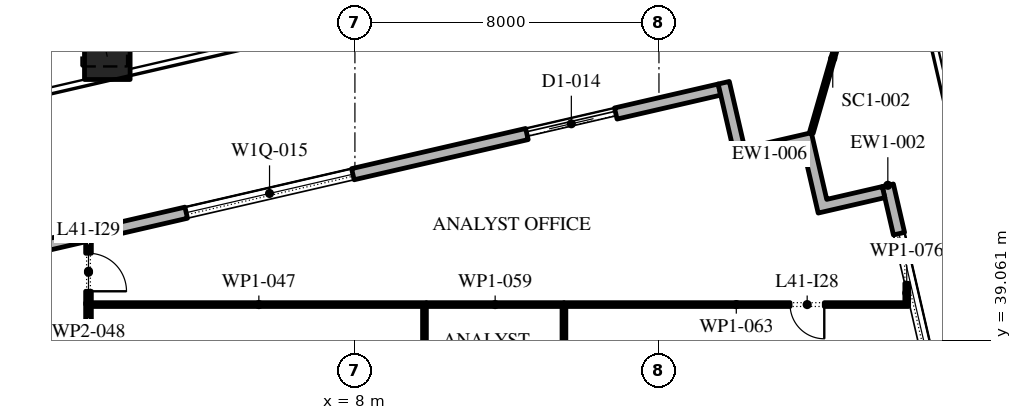
"""IFC4 building model, lengths in metres.
Left out: names, types, materials, properties, quantities, classifications, styles, units other than length and angle.
Written with IfcOpenShell. Run it as: python <this file> out.ifc"""

import sys

from ifc_helpers import new_model, si_unit, direction, frame, frame_2d, origin, origin_2d, place, context, subcontext, project, spatial, polyline, rectangle, outline, extrude, element, fill, save


model = new_model("IFC4")
c1 = context("Model", 3, precision=1e-05, world=origin(), true_north=direction((0.0, 1.0)))
c2 = subcontext(c1, "Body", "Model", "MODEL_VIEW")
j1 = project(units=[si_unit("LENGTHUNIT", "METRE"), si_unit("PLANEANGLEUNIT", "RADIAN")], contexts=[c1])
p1 = place(None, origin())
s1 = spatial("IfcSite", under=j1, at=p1, CompositionType="ELEMENT")
p2 = place(p1, origin())
s2 = spatial("IfcBuilding", under=s1, at=p2, CompositionType="ELEMENT")
p3 = place(p2, frame((0.0, 0.0, 188.4)))
s3 = spatial("IfcBuildingStorey", under=s2, at=p3, CompositionType="ELEMENT", Elevation=188.4)
p4 = place(p3, frame((1.485, 46.522, 0.0), z_axis=(-0.018824669328, 0.081554259734, 0.996491111121), x_axis=(-0.974379530941, -0.22491004798, 0.0)))
e1 = element("IfcColumn", 1, at=p4, inside=s3, PredefinedType="COLUMN", context=c2, shape_type="SweptSolid", body=[
    extrude(rectangle(XDim=1.2, YDim=1.2, at=origin_2d()), origin(), (0.0, 0.0, 1.0), 4.215),
])
p5 = place(p3, frame((33.157, -5.092, 0.0), z_axis=(0.0, 0.0, 1.0), x_axis=(-0.224950279389, 0.974370243697, 0.0)))
e2 = element("IfcWall", 2, at=p5, inside=s3, PredefinedType="STANDARD", context=c2, shape_type="SweptSolid", body=[
    extrude(rectangle(XDim=49.5, YDim=0.3, at=frame_2d((24.75, 0.0))), origin(), (0.0, 0.0, 1.0), 4.0),
])
p6 = place(p5, frame((2.207, 0.0, 0.0)))
e3 = element("IfcOpeningElement", 3, at=p6, cuts=e2, PredefinedType="OPENING", context=c2, shape_type="SweptSolid", body=[
    extrude(rectangle(XDim=2.4, YDim=3.125, at=frame_2d((1.2, 1.562))), frame((0.0, 0.16, 0.0), z_axis=(0.0, -1.0, 0.0), x_axis=(1.0, 0.0, 0.0)), (0.0, 0.0, 1.0), 0.32),
])
p7 = place(p5, frame((8.121, 0.0, 0.45)))
e4 = element("IfcOpeningElement", 4, at=p7, cuts=e2, PredefinedType="OPENING", context=c2, shape_type="SweptSolid", body=[
    extrude(rectangle(XDim=4.5, YDim=2.875, at=frame_2d((2.25, 1.438))), frame((0.0, 0.16, 0.0), z_axis=(0.0, -1.0, 0.0), x_axis=(1.0, 0.0, 0.0)), (0.0, 0.0, 1.0), 0.32),
])
p8 = place(p5, frame((15.236, 0.0, 0.45)))
e5 = element("IfcOpeningElement", 5, at=p8, cuts=e2, PredefinedType="OPENING", context=c2, shape_type="SweptSolid", body=[
    extrude(rectangle(XDim=4.5, YDim=2.875, at=frame_2d((2.25, 1.438))), frame((0.0, 0.16, 0.0), z_axis=(0.0, -1.0, 0.0), x_axis=(1.0, 0.0, 0.0)), (0.0, 0.0, 1.0), 0.32),
])
p9 = place(p5, frame((22.35, 0.0, 0.45)))
e6 = element("IfcOpeningElement", 6, at=p9, cuts=e2, PredefinedType="OPENING", context=c2, shape_type="SweptSolid", body=[
    extrude(rectangle(XDim=4.5, YDim=3.0, at=frame_2d((2.25, 1.5))), frame((0.0, 0.16, 0.0), z_axis=(0.0, -1.0, 0.0), x_axis=(1.0, 0.0, 0.0)), (0.0, 0.0, 1.0), 0.32),
])
p10 = place(p5, frame((30.514, 0.0, 0.0)))
e7 = element("IfcOpeningElement", 7, at=p10, cuts=e2, PredefinedType="OPENING", context=c2, shape_type="SweptSolid", body=[
    extrude(rectangle(XDim=2.4, YDim=3.45, at=frame_2d((1.2, 1.725))), frame((0.0, 0.16, 0.0), z_axis=(0.0, -1.0, 0.0), x_axis=(1.0, 0.0, 0.0)), (0.0, 0.0, 1.0), 0.32),
])
p11 = place(p5, frame((36.579, 0.0, 0.45)))
e8 = element("IfcOpeningElement", 8, at=p11, cuts=e2, PredefinedType="OPENING", context=c2, shape_type="SweptSolid", body=[
    extrude(rectangle(XDim=4.5, YDim=3.05, at=frame_2d((2.25, 1.525))), frame((0.0, 0.16, 0.0), z_axis=(0.0, -1.0, 0.0), x_axis=(1.0, 0.0, 0.0)), (0.0, 0.0, 1.0), 0.32),
])
p12 = place(p5, frame((43.693, 0.0, 0.45)))
e9 = element("IfcOpeningElement", 9, at=p12, cuts=e2, PredefinedType="OPENING", context=c2, shape_type="SweptSolid", body=[
    extrude(rectangle(XDim=4.5, YDim=3.05, at=frame_2d((2.25, 1.525))), frame((0.0, 0.16, 0.0), z_axis=(0.0, -1.0, 0.0), x_axis=(1.0, 0.0, 0.0)), (0.0, 0.0, 1.0), 0.32),
])
p13 = place(p3, frame((17.592, 45.657, 0.0), z_axis=(0.0, 0.0, 1.0), x_axis=(-0.974370243697, -0.224950279389, 0.0)))
e10 = element("IfcWall", 10, at=p13, inside=s3, PredefinedType="STANDARD", context=c2, shape_type="SweptSolid", body=[
    extrude(rectangle(XDim=49.5, YDim=0.3, at=frame_2d((24.75, 0.0))), origin(), (0.0, 0.0, 1.0), 4.0),
])
p14 = place(p13, frame((2.8, 0.0, 0.0)))
e11 = element("IfcOpeningElement", 11, at=p14, cuts=e10, PredefinedType="OPENING", context=c2, shape_type="SweptSolid", body=[
    extrude(rectangle(XDim=2.4, YDim=3.5, at=frame_2d((1.2, 1.75))), frame((0.0, 0.16, 0.0), z_axis=(0.0, -1.0, 0.0), x_axis=(1.0, 0.0, 0.0)), (0.0, 0.0, 1.0), 0.32),
])
p15 = place(p13, frame((9.9, 0.0, 0.45)))
e12 = element("IfcOpeningElement", 12, at=p15, cuts=e10, PredefinedType="OPENING", context=c2, shape_type="SweptSolid", body=[
    extrude(rectangle(XDim=4.5, YDim=2.45, at=frame_2d((2.25, 1.225))), frame((0.0, 0.16, 0.0), z_axis=(0.0, -1.0, 0.0), x_axis=(1.0, 0.0, 0.0)), (0.0, 0.0, 1.0), 0.32),
])
p16 = place(p13, frame((18.2, 0.0, 0.45)))
e13 = element("IfcOpeningElement", 13, at=p16, cuts=e10, PredefinedType="OPENING", context=c2, shape_type="SweptSolid", body=[
    extrude(rectangle(XDim=4.5, YDim=2.45, at=frame_2d((2.25, 1.225))), frame((0.0, 0.16, 0.0), z_axis=(0.0, -1.0, 0.0), x_axis=(1.0, 0.0, 0.0)), (0.0, 0.0, 1.0), 0.32),
])
p17 = place(p13, frame((26.5, 0.0, 0.45)))
e14 = element("IfcOpeningElement", 14, at=p17, cuts=e10, PredefinedType="OPENING", context=c2, shape_type="SweptSolid", body=[
    extrude(rectangle(XDim=4.5, YDim=2.525, at=frame_2d((2.25, 1.262))), frame((0.0, 0.16, 0.0), z_axis=(0.0, -1.0, 0.0), x_axis=(1.0, 0.0, 0.0)), (0.0, 0.0, 1.0), 0.32),
])
p18 = place(p13, frame((35.85, 0.0, 0.0)))
e15 = element("IfcOpeningElement", 15, at=p18, cuts=e10, PredefinedType="OPENING", context=c2, shape_type="SweptSolid", body=[
    extrude(rectangle(XDim=2.4, YDim=3.5, at=frame_2d((1.2, 1.75))), frame((0.0, 0.16, 0.0), z_axis=(0.0, -1.0, 0.0), x_axis=(1.0, 0.0, 0.0)), (0.0, 0.0, 1.0), 0.32),
])
p19 = place(p13, frame((43.1, 0.0, 0.45)))
e16 = element("IfcOpeningElement", 16, at=p19, cuts=e10, PredefinedType="OPENING", context=c2, shape_type="SweptSolid", body=[
    extrude(rectangle(XDim=4.5, YDim=2.675, at=frame_2d((2.25, 1.337))), frame((0.0, 0.16, 0.0), z_axis=(0.0, -1.0, 0.0), x_axis=(1.0, 0.0, 0.0)), (0.0, 0.0, 1.0), 0.32),
])
p20 = place(p3, origin())
e17 = element("IfcWall", 17, at=p20, inside=s3, PredefinedType="STANDARD", context=c2, shape_type="SweptSolid", body=[
    extrude(outline(polyline([(19.785, 44.162), (18.031, 43.757), (17.558, 45.803), (17.851, 45.871), (18.256, 44.117), (20.01, 44.522), (20.414, 42.768), (21.876, 43.105), (21.943, 42.813), (20.19, 42.408), (19.785, 44.162)])), origin(), (0.0, 0.0, 1.0), 4.0),
])
p21 = place(p3, frame((20.01, 44.522, -0.05), z_axis=(0.0, 0.0, 1.0), x_axis=(0.276962557442, 0.960880711522, 0.0)))
e18 = element("IfcWall", 18, at=p21, inside=s3, PredefinedType="STANDARD", context=c2, shape_type="SweptSolid", body=[
    extrude(rectangle(XDim=4.07, YDim=0.1, at=frame_2d((2.035, 0.0))), origin(), (0.0, 0.0, 1.0), 4.05),
])
p22 = place(p3, frame((0.99, 40.05, 0.0), z_axis=(0.0, 0.0, 1.0), x_axis=(0.0, -1.0, 0.0)))
e19 = element("IfcWall", 19, at=p22, inside=s3, PredefinedType="PARTITIONING", context=c2, shape_type="SweptSolid", body=[
    extrude(rectangle(XDim=8.55, YDim=0.15, at=frame_2d((4.275, 0.0))), origin(), (0.0, 0.0, 1.0), 4.0),
])
p23 = place(p22, frame((2.9, 0.0, 0.0)))
e20 = element("IfcOpeningElement", 20, at=p23, cuts=e19, PredefinedType="OPENING", context=c2, shape_type="SweptSolid", body=[
    extrude(rectangle(XDim=1.0, YDim=2.1, at=frame_2d((0.5, 1.05))), frame((0.0, 0.085, 0.0), z_axis=(0.0, -1.0, 0.0), x_axis=(1.0, 0.0, 0.0)), (0.0, 0.0, 1.0), 0.17),
])
p24 = place(p3, frame((1.065, 40.0, 0.0), z_axis=(0.0, 0.0, 1.0), x_axis=(1.0, 0.0, 0.0)))
e21 = element("IfcWall", 21, at=p24, inside=s3, PredefinedType="PARTITIONING", context=c2, shape_type="SweptSolid", body=[
    extrude(rectangle(XDim=8.815, YDim=0.1, at=frame_2d((4.407, 0.0))), origin(), (0.0, 0.0, 1.0), 4.0),
])
p25 = place(p3, frame((0.99, 41.753, 0.0), z_axis=(0.0, 0.0, 1.0), x_axis=(0.0, -1.0, 0.0)))
e22 = element("IfcWall", 22, at=p25, inside=s3, PredefinedType="PARTITIONING", context=c2, shape_type="SweptSolid", body=[
    extrude(rectangle(XDim=1.753, YDim=0.15, at=frame_2d((0.876, 0.0))), origin(), (0.0, 0.0, 1.0), 4.0),
])
p26 = place(p25, frame((0.403, 0.0, 0.0)))
e23 = element("IfcOpeningElement", 23, at=p26, cuts=e22, PredefinedType="OPENING", context=c2, shape_type="SweptSolid", body=[
    extrude(rectangle(XDim=1.0, YDim=2.1, at=frame_2d((0.5, 1.05))), frame((0.0, 0.085, 0.0), z_axis=(0.0, -1.0, 0.0), x_axis=(1.0, 0.0, 0.0)), (0.0, 0.0, 1.0), 0.17),
])
p27 = place(p3, frame((9.83, 39.95, 0.0), z_axis=(0.0, 0.0, 1.0), x_axis=(0.0, -1.0, 0.0)))
e24 = element("IfcWall", 24, at=p27, inside=s3, PredefinedType="PARTITIONING", context=c2, shape_type="SweptSolid", body=[
    extrude(rectangle(XDim=8.4, YDim=0.1, at=frame_2d((4.2, 0.0))), origin(), (0.0, 0.0, 1.0), 4.0),
])
p28 = place(p27, frame((4.6, 0.0, 0.0)))
e25 = element("IfcOpeningElement", 25, at=p28, cuts=e24, PredefinedType="OPENING", context=c2, shape_type="SweptSolid", body=[
    extrude(rectangle(XDim=0.9, YDim=2.1, at=frame_2d((0.45, 1.05))), frame((0.0, 0.06, 0.0), z_axis=(0.0, -1.0, 0.0), x_axis=(1.0, 0.0, 0.0)), (0.0, 0.0, 1.0), 0.12),
])
p29 = place(p3, frame((9.88, 40.0, 0.0), z_axis=(0.0, 0.0, 1.0), x_axis=(1.0, 0.0, 0.0)))
e26 = element("IfcWall", 26, at=p29, inside=s3, PredefinedType="PARTITIONING", context=c2, shape_type="SweptSolid", body=[
    extrude(rectangle(XDim=3.62, YDim=0.1, at=frame_2d((1.81, 0.0))), origin(), (0.0, 0.0, 1.0), 4.0),
])
p30 = place(p3, frame((13.5, 39.95, 0.0), z_axis=(0.0, 0.0, 1.0), x_axis=(0.0, -1.0, 0.0)))
e27 = element("IfcWall", 27, at=p30, inside=s3, PredefinedType="PARTITIONING", context=c2, shape_type="SweptSolid", body=[
    extrude(rectangle(XDim=8.4, YDim=0.1, at=frame_2d((4.2, 0.0))), origin(), (0.0, 0.0, 1.0), 4.0),
])
p31 = place(p3, frame((13.5, 40.0, 0.0), z_axis=(0.0, 0.0, 1.0), x_axis=(1.0, 0.0, 0.0)))
e28 = element("IfcWall", 28, at=p31, inside=s3, PredefinedType="PARTITIONING", context=c2, shape_type="SweptSolid", body=[
    extrude(rectangle(XDim=9.07, YDim=0.1, at=frame_2d((4.535, 0.0))), origin(), (0.0, 0.0, 1.0), 4.0),
])
p32 = place(p31, frame((5.95, 0.0, 0.0)))
e29 = element("IfcOpeningElement", 29, at=p32, cuts=e28, PredefinedType="OPENING", context=c2, shape_type="SweptSolid", body=[
    extrude(rectangle(XDim=0.9, YDim=2.1, at=frame_2d((0.45, 1.05))), frame((0.0, 0.06, 0.0), z_axis=(0.0, -1.0, 0.0), x_axis=(1.0, 0.0, 0.0)), (0.0, 0.0, 1.0), 0.12),
])
p33 = place(p3, frame((22.52, 40.05, 0.0), z_axis=(0.0, 0.0, 1.0), x_axis=(0.0, 1.0, 0.0)))
e30 = element("IfcWall", 30, at=p33, inside=s3, PredefinedType="PARTITIONING", context=c2, shape_type="SweptSolid", body=[
    extrude(rectangle(XDim=0.51, YDim=0.1, at=frame_2d((0.255, 0.0))), origin(), (0.0, 0.0, 1.0), 4.0),
])
p34 = place(p12, origin())
e31 = element("IfcWindow", 31, at=p34, inside=s3, PartitioningType="DOUBLE_PANEL_VERTICAL", PredefinedType="WINDOW", context=c2, shape_type="SweptSolid", body=[
    extrude(rectangle(XDim=4.5, YDim=3.05, at=frame_2d((2.25, 1.525))), frame((0.0, 0.03, 0.0), z_axis=(0.0, -1.0, 0.0), x_axis=(1.0, 0.0, 0.0)), (0.0, 0.0, 1.0), 0.06),
])
fill(e9, e31)
p35 = place(p14, origin())
e32 = element("IfcDoor", 32, at=p35, inside=s3, OperationType="DOUBLE_DOOR_SLIDING", PredefinedType="DOOR", context=c2, shape_type="SweptSolid", body=[
    extrude(rectangle(XDim=2.4, YDim=3.5, at=frame_2d((1.2, 1.75))), frame((0.0, 0.025, 0.0), z_axis=(0.0, -1.0, 0.0), x_axis=(1.0, 0.0, 0.0)), (0.0, 0.0, 1.0), 0.05),
])
fill(e11, e32)
p36 = place(p15, origin())
e33 = element("IfcWindow", 33, at=p36, inside=s3, PartitioningType="DOUBLE_PANEL_VERTICAL", PredefinedType="WINDOW", context=c2, shape_type="SweptSolid", body=[
    extrude(rectangle(XDim=4.5, YDim=2.45, at=frame_2d((2.25, 1.225))), frame((0.0, 0.03, 0.0), z_axis=(0.0, -1.0, 0.0), x_axis=(1.0, 0.0, 0.0)), (0.0, 0.0, 1.0), 0.06),
])
fill(e12, e33)
p37 = place(p32, frame((0.9, 0.0, 0.0), z_axis=(0.0, 0.0, 1.0), x_axis=(-1.0, 0.0, 0.0)))
e34 = element("IfcDoor", 34, at=p37, inside=s3, OperationType="SINGLE_SWING_RIGHT", PredefinedType="DOOR", context=c2, shape_type="SweptSolid", body=[
    extrude(rectangle(XDim=0.9, YDim=2.1, at=frame_2d((0.45, 1.05))), frame((0.0, 0.025, 0.0), z_axis=(0.0, -1.0, 0.0), x_axis=(1.0, 0.0, 0.0)), (0.0, 0.0, 1.0), 0.05),
])
fill(e29, e34)
p38 = place(p26, origin())
e35 = element("IfcDoor", 35, at=p38, inside=s3, OperationType="SINGLE_SWING_LEFT", PredefinedType="DOOR", context=c2, shape_type="SweptSolid", body=[
    extrude(rectangle(XDim=1.0, YDim=2.1, at=frame_2d((0.5, 1.05))), frame((0.0, 0.025, 0.0), z_axis=(0.0, -1.0, 0.0), x_axis=(1.0, 0.0, 0.0)), (0.0, 0.0, 1.0), 0.05),
])
fill(e23, e35)
save(model, sys.argv[1])
